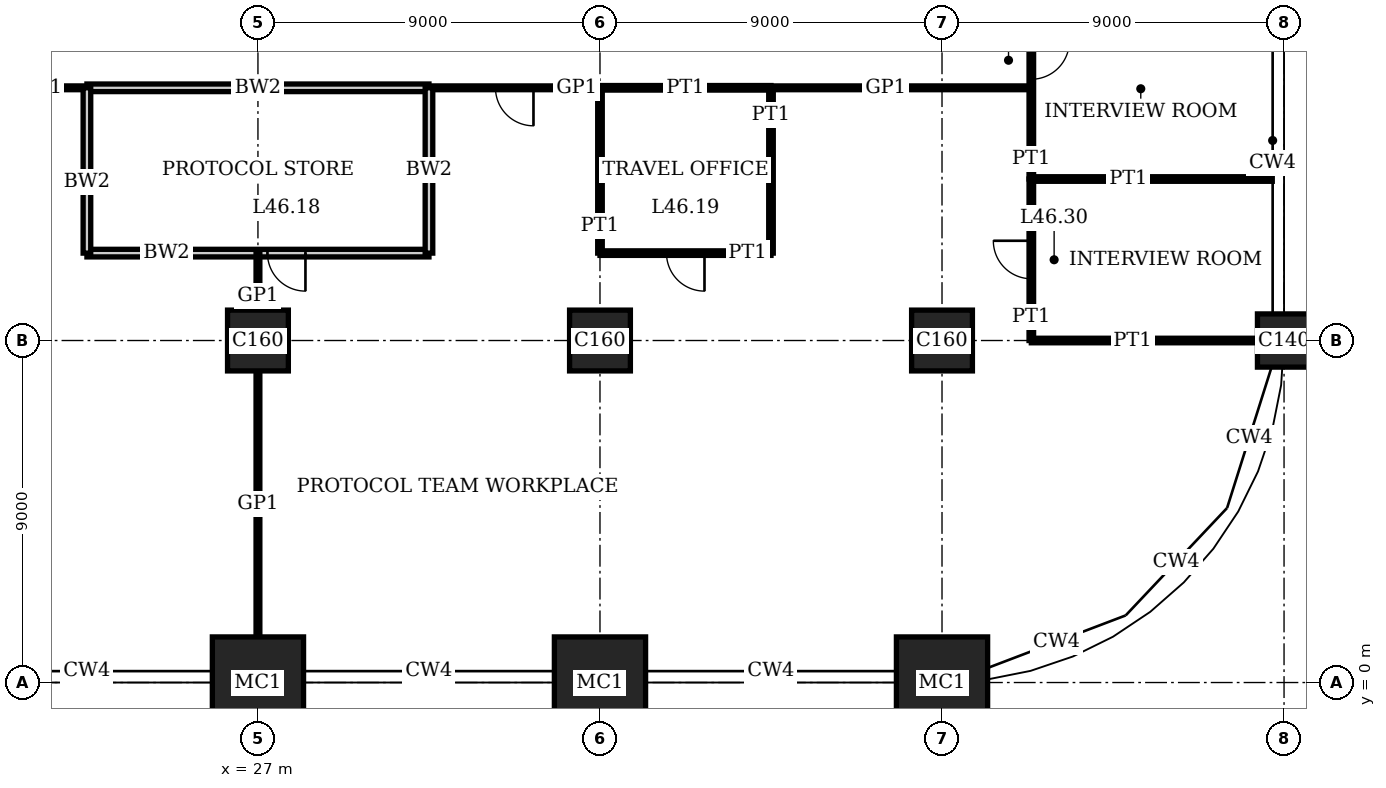
"""IFC4 building model, lengths in metres.
Left out: names, types, materials, properties, quantities, classifications, styles, units other than length and angle.
Written with IfcOpenShell. Run it as: python <this file> out.ifc"""

import sys

from ifc_helpers import new_model, si_unit, direction, frame, frame_2d, origin, origin_2d, place, context, subcontext, project, spatial, rectangle, extrude, element, fill, save


model = new_model("IFC4")
c1 = context("Model", 3, precision=1e-05, world=origin(), true_north=direction((0.0, 1.0)))
c2 = subcontext(c1, "Body", "Model", "MODEL_VIEW")
j1 = project(units=[si_unit("LENGTHUNIT", "METRE"), si_unit("PLANEANGLEUNIT", "RADIAN")], contexts=[c1])
p1 = place(None, origin())
s1 = spatial("IfcSite", under=j1, at=p1, CompositionType="ELEMENT")
p2 = place(p1, origin())
s2 = spatial("IfcBuilding", under=s1, at=p2, CompositionType="ELEMENT")
p3 = place(p2, frame((0.0, 0.0, 190.2)))
s3 = spatial("IfcBuildingStorey", under=s2, at=p3, CompositionType="ELEMENT", Elevation=190.2)
p4 = place(p3, frame((27.0, 0.0, 0.0), z_axis=(0.0, 0.0, 1.0), x_axis=(1.0, 0.0, 0.0)))
e1 = element("IfcColumn", 1, at=p4, inside=s3, PredefinedType="COLUMN", context=c2, shape_type="SweptSolid", body=[
    extrude(rectangle(XDim=2.4, YDim=2.4, at=origin_2d()), origin(), (0.0, 0.0, 1.0), 4.0),
])
p5 = place(p3, frame((27.0, 9.0, 0.0), z_axis=(0.0, 0.0, 1.0), x_axis=(1.0, 0.0, 0.0)))
e2 = element("IfcColumn", 2, at=p5, inside=s3, PredefinedType="COLUMN", context=c2, shape_type="SweptSolid", body=[
    extrude(rectangle(XDim=1.6, YDim=1.6, at=origin_2d()), origin(), (0.0, 0.0, 1.0), 4.0),
])
p6 = place(p3, frame((36.0, 0.0, 0.0), z_axis=(0.0, 0.0, 1.0), x_axis=(1.0, 0.0, 0.0)))
e3 = element("IfcColumn", 3, at=p6, inside=s3, PredefinedType="COLUMN", context=c2, shape_type="SweptSolid", body=[
    extrude(rectangle(XDim=2.4, YDim=2.4, at=origin_2d()), origin(), (0.0, 0.0, 1.0), 4.0),
])
p7 = place(p3, frame((36.0, 9.0, 0.0), z_axis=(0.0, 0.0, 1.0), x_axis=(1.0, 0.0, 0.0)))
e4 = element("IfcColumn", 4, at=p7, inside=s3, PredefinedType="COLUMN", context=c2, shape_type="SweptSolid", body=[
    extrude(rectangle(XDim=1.6, YDim=1.6, at=origin_2d()), origin(), (0.0, 0.0, 1.0), 4.0),
])
p8 = place(p3, frame((45.0, 0.0, 0.0), z_axis=(0.0, 0.0, 1.0), x_axis=(1.0, 0.0, 0.0)))
e5 = element("IfcColumn", 5, at=p8, inside=s3, PredefinedType="COLUMN", context=c2, shape_type="SweptSolid", body=[
    extrude(rectangle(XDim=2.4, YDim=2.4, at=origin_2d()), origin(), (0.0, 0.0, 1.0), 4.0),
])
p9 = place(p3, frame((45.0, 9.0, 0.0), z_axis=(0.0, 0.0, 1.0), x_axis=(1.0, 0.0, 0.0)))
e6 = element("IfcColumn", 6, at=p9, inside=s3, PredefinedType="COLUMN", context=c2, shape_type="SweptSolid", body=[
    extrude(rectangle(XDim=1.6, YDim=1.6, at=origin_2d()), origin(), (0.0, 0.0, 1.0), 4.0),
])
p10 = place(p3, frame((54.0, 9.0, 0.0), z_axis=(0.0, 0.0, 1.0), x_axis=(1.0, 0.0, 0.0)))
e7 = element("IfcColumn", 7, at=p10, inside=s3, PredefinedType="COLUMN", context=c2, shape_type="SweptSolid", body=[
    extrude(rectangle(XDim=1.4, YDim=1.4, at=origin_2d()), origin(), (0.0, 0.0, 1.0), 4.0),
])
p11 = place(p3, frame((47.35, 9.0, 0.0), z_axis=(0.0, 0.0, 1.0), x_axis=(1.0, 0.0, 0.0)))
e8 = element("IfcWall", 8, at=p11, inside=s3, PredefinedType="PARTITIONING", context=c2, shape_type="SweptSolid", body=[
    extrude(rectangle(XDim=5.95, YDim=0.12, at=frame_2d((2.975, 0.0))), origin(), (0.0, 0.0, 1.0), 3.05),
])
p12 = place(p3, frame((22.5, 11.3, 0.0), z_axis=(0.0, 0.0, 1.0), x_axis=(1.0, 0.0, 0.0)))
e9 = element("IfcWall", 9, at=p12, inside=s3, PredefinedType="SOLIDWALL", context=c2, shape_type="SweptSolid", body=[
    extrude(rectangle(XDim=9.0, YDim=0.2, at=frame_2d((4.5, 0.0))), origin(), (0.0, 0.0, 1.0), 3.75),
])
p13 = place(p12, frame((4.75, 0.0, 0.0)))
e10 = element("IfcOpeningElement", 10, at=p13, cuts=e9, PredefinedType="OPENING", context=c2, shape_type="SweptSolid", body=[
    extrude(rectangle(XDim=1.0, YDim=2.4, at=frame_2d((0.5, 1.2))), frame((0.0, 0.11, 0.0), z_axis=(0.0, -1.0, 0.0), x_axis=(1.0, 0.0, 0.0)), (0.0, 0.0, 1.0), 0.22),
])
p14 = place(p3, frame((36.0, 11.3, 0.0), z_axis=(0.0, 0.0, 1.0), x_axis=(1.0, 0.0, 0.0)))
e11 = element("IfcWall", 11, at=p14, inside=s3, PredefinedType="PARTITIONING", context=c2, shape_type="SweptSolid", body=[
    extrude(rectangle(XDim=4.5, YDim=0.12, at=frame_2d((2.25, 0.0))), origin(), (0.0, 0.0, 1.0), 3.75),
])
p15 = place(p14, frame((1.75, 0.0, 0.0)))
e12 = element("IfcOpeningElement", 12, at=p15, cuts=e11, PredefinedType="OPENING", context=c2, shape_type="SweptSolid", body=[
    extrude(rectangle(XDim=1.0, YDim=2.4, at=frame_2d((0.5, 1.2))), frame((0.0, 0.07, 0.0), z_axis=(0.0, -1.0, 0.0), x_axis=(1.0, 0.0, 0.0)), (0.0, 0.0, 1.0), 0.14),
])
p16 = place(p3, frame((47.35, 13.25, 0.0), z_axis=(0.0, 0.0, 1.0), x_axis=(1.0, 0.0, 0.0)))
e13 = element("IfcWall", 13, at=p16, inside=s3, PredefinedType="PARTITIONING", context=c2, shape_type="SweptSolid", body=[
    extrude(rectangle(XDim=6.34, YDim=0.12, at=frame_2d((3.17, 0.0))), origin(), (0.0, 0.0, 1.0), 3.1),
])
p17 = place(p3, frame((22.5, 15.65, 0.0), z_axis=(0.0, 0.0, 1.0), x_axis=(1.0, 0.0, 0.0)))
e14 = element("IfcWall", 14, at=p17, inside=s3, PredefinedType="SOLIDWALL", context=c2, shape_type="SweptSolid", body=[
    extrude(rectangle(XDim=9.0, YDim=0.2, at=frame_2d((4.5, 0.0))), origin(), (0.0, 0.0, 1.0), 3.75),
])
p18 = place(p3, frame((36.0, 15.65, 0.0), z_axis=(0.0, 0.0, 1.0), x_axis=(1.0, 0.0, 0.0)))
e15 = element("IfcWall", 15, at=p18, inside=s3, PredefinedType="PARTITIONING", context=c2, shape_type="SweptSolid", body=[
    extrude(rectangle(XDim=4.5, YDim=0.12, at=frame_2d((2.25, 0.0))), origin(), (0.0, 0.0, 1.0), 3.75),
])
p19 = place(p3, frame((15.65, 15.65, 0.0), z_axis=(0.0, 0.0, 1.0), x_axis=(1.0, 0.0, 0.0)))
e16 = element("IfcWall", 16, at=p19, inside=s3, PredefinedType="PARTITIONING", context=c2, shape_type="SweptSolid", body=[
    extrude(rectangle(XDim=6.85, YDim=0.1, at=frame_2d((3.425, 0.0))), origin(), (0.0, 0.0, 1.0), 3.75),
])
p20 = place(p19, frame((2.925, 0.0, 0.0)))
e17 = element("IfcOpeningElement", 17, at=p20, cuts=e16, PredefinedType="OPENING", context=c2, shape_type="SweptSolid", body=[
    extrude(rectangle(XDim=1.0, YDim=2.4, at=frame_2d((0.5, 1.2))), frame((0.0, 0.06, 0.0), z_axis=(0.0, -1.0, 0.0), x_axis=(1.0, 0.0, 0.0)), (0.0, 0.0, 1.0), 0.12),
])
p21 = place(p3, frame((31.5, 15.65, 0.0), z_axis=(0.0, 0.0, 1.0), x_axis=(1.0, 0.0, 0.0)))
e18 = element("IfcWall", 18, at=p21, inside=s3, PredefinedType="PARTITIONING", context=c2, shape_type="SweptSolid", body=[
    extrude(rectangle(XDim=4.5, YDim=0.1, at=frame_2d((2.25, 0.0))), origin(), (0.0, 0.0, 1.0), 3.75),
])
p22 = place(p21, frame((1.75, 0.0, 0.0)))
e19 = element("IfcOpeningElement", 19, at=p22, cuts=e18, PredefinedType="OPENING", context=c2, shape_type="SweptSolid", body=[
    extrude(rectangle(XDim=1.0, YDim=2.4, at=frame_2d((0.5, 1.2))), frame((0.0, 0.06, 0.0), z_axis=(0.0, -1.0, 0.0), x_axis=(1.0, 0.0, 0.0)), (0.0, 0.0, 1.0), 0.12),
])
p23 = place(p3, frame((40.5, 15.65, 0.0), z_axis=(0.0, 0.0, 1.0), x_axis=(1.0, 0.0, 0.0)))
e20 = element("IfcWall", 20, at=p23, inside=s3, PredefinedType="PARTITIONING", context=c2, shape_type="SweptSolid", body=[
    extrude(rectangle(XDim=6.85, YDim=0.1, at=frame_2d((3.425, 0.0))), origin(), (0.0, 0.0, 1.0), 3.75),
])
p24 = place(p3, frame((22.5, 11.3, 0.0), z_axis=(0.0, 0.0, 1.0), x_axis=(0.0, 1.0, 0.0)))
e21 = element("IfcWall", 21, at=p24, inside=s3, PredefinedType="SOLIDWALL", context=c2, shape_type="SweptSolid", body=[
    extrude(rectangle(XDim=4.35, YDim=0.2, at=frame_2d((2.175, 0.0))), origin(), (0.0, 0.0, 1.0), 3.75),
])
p25 = place(p3, frame((27.0, 1.2, 0.0), z_axis=(0.0, 0.0, 1.0), x_axis=(0.0, 1.0, 0.0)))
e22 = element("IfcWall", 22, at=p25, inside=s3, PredefinedType="PARTITIONING", context=c2, shape_type="SweptSolid", body=[
    extrude(rectangle(XDim=7.0, YDim=0.1, at=frame_2d((3.5, 0.0))), origin(), (0.0, 0.0, 1.0), 3.05),
])
p26 = place(p3, frame((27.0, 9.8, 0.0), z_axis=(0.0, 0.0, 1.0), x_axis=(0.0, 1.0, 0.0)))
e23 = element("IfcWall", 23, at=p26, inside=s3, PredefinedType="PARTITIONING", context=c2, shape_type="SweptSolid", body=[
    extrude(rectangle(XDim=1.51, YDim=0.1, at=frame_2d((0.755, 0.0))), origin(), (0.0, 0.0, 1.0), 3.05),
])
p27 = place(p3, frame((31.5, 11.3, 0.0), z_axis=(0.0, 0.0, 1.0), x_axis=(0.0, 1.0, 0.0)))
e24 = element("IfcWall", 24, at=p27, inside=s3, PredefinedType="SOLIDWALL", context=c2, shape_type="SweptSolid", body=[
    extrude(rectangle(XDim=4.35, YDim=0.2, at=frame_2d((2.175, 0.0))), origin(), (0.0, 0.0, 1.0), 3.75),
])
p28 = place(p3, frame((36.0, 11.3, 0.0), z_axis=(0.0, 0.0, 1.0), x_axis=(0.0, 1.0, 0.0)))
e25 = element("IfcWall", 25, at=p28, inside=s3, PredefinedType="PARTITIONING", context=c2, shape_type="SweptSolid", body=[
    extrude(rectangle(XDim=4.35, YDim=0.12, at=frame_2d((2.175, 0.0))), origin(), (0.0, 0.0, 1.0), 3.05),
])
p29 = place(p3, frame((40.5, 11.3, 0.0), z_axis=(0.0, 0.0, 1.0), x_axis=(0.0, 1.0, 0.0)))
e26 = element("IfcWall", 26, at=p29, inside=s3, PredefinedType="PARTITIONING", context=c2, shape_type="SweptSolid", body=[
    extrude(rectangle(XDim=4.35, YDim=0.12, at=frame_2d((2.175, 0.0))), origin(), (0.0, 0.0, 1.0), 3.75),
])
p30 = place(p3, frame((47.35, 9.0, 0.0), z_axis=(0.0, 0.0, 1.0), x_axis=(0.0, 1.0, 0.0)))
e27 = element("IfcWall", 27, at=p30, inside=s3, PredefinedType="PARTITIONING", context=c2, shape_type="SweptSolid", body=[
    extrude(rectangle(XDim=4.25, YDim=0.12, at=frame_2d((2.125, 0.0))), origin(), (0.0, 0.0, 1.0), 3.75),
])
p31 = place(p30, frame((1.625, 0.0, 0.0)))
e28 = element("IfcOpeningElement", 28, at=p31, cuts=e27, PredefinedType="OPENING", context=c2, shape_type="SweptSolid", body=[
    extrude(rectangle(XDim=1.0, YDim=2.4, at=frame_2d((0.5, 1.2))), frame((0.0, 0.07, 0.0), z_axis=(0.0, -1.0, 0.0), x_axis=(1.0, 0.0, 0.0)), (0.0, 0.0, 1.0), 0.14),
])
p32 = place(p3, frame((47.35, 13.25, 0.0), z_axis=(0.0, 0.0, 1.0), x_axis=(0.0, 1.0, 0.0)))
e29 = element("IfcWall", 29, at=p32, inside=s3, PredefinedType="PARTITIONING", context=c2, shape_type="SweptSolid", body=[
    extrude(rectangle(XDim=4.75, YDim=0.12, at=frame_2d((2.375, 0.0))), origin(), (0.0, 0.0, 1.0), 3.75),
])
p33 = place(p32, frame((2.625, 0.0, 0.0)))
e30 = element("IfcOpeningElement", 30, at=p33, cuts=e29, PredefinedType="OPENING", context=c2, shape_type="SweptSolid", body=[
    extrude(rectangle(XDim=1.0, YDim=2.4, at=frame_2d((0.5, 1.2))), frame((0.0, 0.07, 0.0), z_axis=(0.0, -1.0, 0.0), x_axis=(1.0, 0.0, 0.0)), (0.0, 0.0, 1.0), 0.14),
])
p34 = place(p13, origin())
e31 = element("IfcDoor", 31, at=p34, inside=s3, OperationType="SINGLE_SWING_RIGHT", PredefinedType="DOOR", context=c2, shape_type="SweptSolid", body=[
    extrude(rectangle(XDim=1.0, YDim=2.4, at=frame_2d((0.5, 1.2))), frame((0.0, 0.035, 0.0), z_axis=(0.0, -1.0, 0.0), x_axis=(1.0, 0.0, 0.0)), (0.0, 0.0, 1.0), 0.07),
])
fill(e10, e31)
p35 = place(p15, origin())
e32 = element("IfcDoor", 32, at=p35, inside=s3, OperationType="SINGLE_SWING_RIGHT", PredefinedType="DOOR", context=c2, shape_type="SweptSolid", body=[
    extrude(rectangle(XDim=1.0, YDim=2.4, at=frame_2d((0.5, 1.2))), frame((0.0, 0.025, 0.0), z_axis=(0.0, -1.0, 0.0), x_axis=(1.0, 0.0, 0.0)), (0.0, 0.0, 1.0), 0.05),
])
fill(e12, e32)
p36 = place(p22, origin())
e33 = element("IfcDoor", 33, at=p36, inside=s3, OperationType="SINGLE_SWING_RIGHT", PredefinedType="DOOR", context=c2, shape_type="SweptSolid", body=[
    extrude(rectangle(XDim=1.0, YDim=2.4, at=frame_2d((0.5, 1.2))), frame((0.0, 0.02, 0.0), z_axis=(0.0, -1.0, 0.0), x_axis=(1.0, 0.0, 0.0)), (0.0, 0.0, 1.0), 0.04),
])
fill(e19, e33)
p37 = place(p31, origin())
e34 = element("IfcDoor", 34, at=p37, inside=s3, OperationType="SINGLE_SWING_LEFT", PredefinedType="DOOR", context=c2, shape_type="SweptSolid", body=[
    extrude(rectangle(XDim=1.0, YDim=2.4, at=frame_2d((0.5, 1.2))), frame((0.0, 0.025, 0.0), z_axis=(0.0, -1.0, 0.0), x_axis=(1.0, 0.0, 0.0)), (0.0, 0.0, 1.0), 0.05),
])
fill(e28, e34)
p38 = place(p33, origin())
e35 = element("IfcDoor", 35, at=p38, inside=s3, OperationType="SINGLE_SWING_RIGHT", PredefinedType="DOOR", context=c2, shape_type="SweptSolid", body=[
    extrude(rectangle(XDim=1.0, YDim=2.4, at=frame_2d((0.5, 1.2))), frame((0.0, 0.025, 0.0), z_axis=(0.0, -1.0, 0.0), x_axis=(1.0, 0.0, 0.0)), (0.0, 0.0, 1.0), 0.05),
])
fill(e30, e35)
save(model, sys.argv[1])
